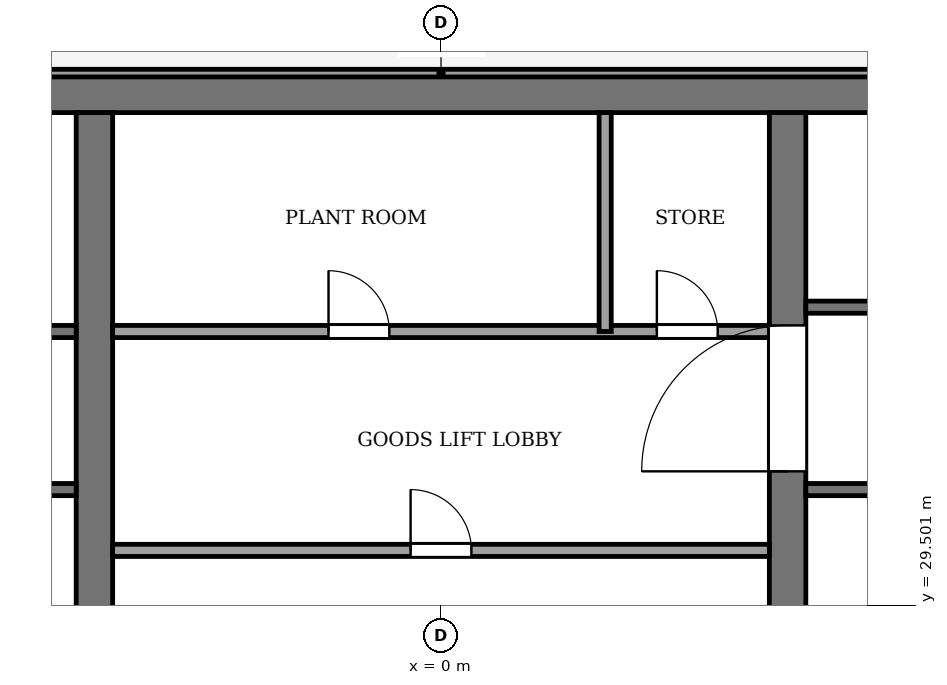
"""IFC4 building model, lengths in metres.
Left out: names, types, materials, properties, quantities, classifications, styles, units other than length and angle.
Written with IfcOpenShell. Run it as: python <this file> out.ifc"""

import sys

from ifc_helpers import new_model, si_unit, direction, frame, frame_2d, origin, place, context, subcontext, project, spatial, rectangle, extrude, element, fill, save


model = new_model("IFC4")
c1 = context("Model", 3, precision=1e-05, world=origin(), true_north=direction((0.0, 1.0)))
c2 = subcontext(c1, "Body", "Model", "MODEL_VIEW")
j1 = project(units=[si_unit("LENGTHUNIT", "METRE"), si_unit("PLANEANGLEUNIT", "RADIAN")], contexts=[c1])
p1 = place(None, origin())
s1 = spatial("IfcSite", under=j1, at=p1, CompositionType="ELEMENT")
p2 = place(p1, origin())
s2 = spatial("IfcBuilding", under=s1, at=p2, CompositionType="ELEMENT")
p3 = place(p2, frame((0.0, 0.0, 364.0)))
s3 = spatial("IfcBuildingStorey", under=s2, at=p3, CompositionType="ELEMENT", Elevation=364.0)
p4 = place(p3, frame((-13.2, 37.9, -0.15), z_axis=(0.0, 0.0, 1.0), x_axis=(1.0, 0.0, 0.0)))
e1 = element("IfcWall", 1, at=p4, inside=s3, PredefinedType="SHEAR", context=c2, shape_type="SweptSolid", body=[
    extrude(rectangle(XDim=26.4, YDim=0.6, at=frame_2d((13.2, 0.0))), origin(), (0.0, 0.0, 1.0), 4.0),
])
p5 = place(p3, frame((-5.7, 18.4, -0.15), z_axis=(0.0, 0.0, 1.0), x_axis=(0.0, 1.0, 0.0)))
e2 = element("IfcWall", 2, at=p5, inside=s3, PredefinedType="SHEAR", context=c2, shape_type="SweptSolid", body=[
    extrude(rectangle(XDim=19.2, YDim=0.6, at=frame_2d((9.6, 0.0))), origin(), (0.0, 0.0, 1.0), 4.0),
])
p6 = place(p5, frame((8.35, 0.0, 0.15)))
e3 = element("IfcOpeningElement", 3, at=p6, cuts=e2, PredefinedType="OPENING", context=c2, shape_type="SweptSolid", body=[
    extrude(rectangle(XDim=0.9, YDim=2.1, at=frame_2d((0.45, 1.05))), frame((0.0, 0.31, 0.0), z_axis=(0.0, -1.0, 0.0), x_axis=(1.0, 0.0, 0.0)), (0.0, 0.0, 1.0), 0.62),
])
p7 = place(p3, frame((5.7, 18.4, -0.15), z_axis=(0.0, 0.0, 1.0), x_axis=(0.0, 1.0, 0.0)))
e4 = element("IfcWall", 4, at=p7, inside=s3, PredefinedType="SHEAR", context=c2, shape_type="SweptSolid", body=[
    extrude(rectangle(XDim=19.2, YDim=0.6, at=frame_2d((9.6, 0.0))), origin(), (0.0, 0.0, 1.0), 4.0),
])
p8 = place(p7, frame((13.3, 0.0, 0.15)))
e5 = element("IfcOpeningElement", 5, at=p8, cuts=e4, PredefinedType="OPENING", context=c2, shape_type="SweptSolid", body=[
    extrude(rectangle(XDim=2.4, YDim=2.4, at=frame_2d((1.2, 1.2))), frame((0.0, 0.31, 0.0), z_axis=(0.0, -1.0, 0.0), x_axis=(1.0, 0.0, 0.0)), (0.0, 0.0, 1.0), 0.62),
])
p9 = place(p3, frame((-5.4, 30.4, 0.0), z_axis=(0.0, 0.0, 1.0), x_axis=(1.0, 0.0, 0.0)))
e6 = element("IfcWall", 6, at=p9, inside=s3, PredefinedType="PARTITIONING", context=c2, shape_type="SweptSolid", body=[
    extrude(rectangle(XDim=10.8, YDim=0.2, at=frame_2d((5.4, 0.0))), origin(), (0.0, 0.0, 1.0), 3.85),
])
p10 = place(p9, frame((4.9, 0.0, 0.0)))
e7 = element("IfcOpeningElement", 7, at=p10, cuts=e6, PredefinedType="OPENING", context=c2, shape_type="SweptSolid", body=[
    extrude(rectangle(XDim=1.0, YDim=2.1, at=frame_2d((0.5, 1.05))), frame((0.0, 0.11, 0.0), z_axis=(0.0, -1.0, 0.0), x_axis=(1.0, 0.0, 0.0)), (0.0, 0.0, 1.0), 0.22),
])
p11 = place(p3, frame((-12.6, 31.4, 0.0), z_axis=(0.0, 0.0, 1.0), x_axis=(1.0, 0.0, 0.0)))
e8 = element("IfcWall", 8, at=p11, inside=s3, PredefinedType="PARTITIONING", context=c2, shape_type="SweptSolid", body=[
    extrude(rectangle(XDim=6.6, YDim=0.2, at=frame_2d((3.3, 0.0))), origin(), (0.0, 0.0, 1.0), 3.85),
])
p12 = place(p11, frame((1.0, 0.0, 0.0)))
e9 = element("IfcOpeningElement", 9, at=p12, cuts=e8, PredefinedType="OPENING", context=c2, shape_type="SweptSolid", body=[
    extrude(rectangle(XDim=1.2, YDim=2.2, at=frame_2d((0.6, 1.1))), frame((0.0, 0.11, 0.0), z_axis=(0.0, -1.0, 0.0), x_axis=(1.0, 0.0, 0.0)), (0.0, 0.0, 1.0), 0.22),
])
p13 = place(p3, frame((6.0, 31.4, 0.0), z_axis=(0.0, 0.0, 1.0), x_axis=(1.0, 0.0, 0.0)))
e10 = element("IfcWall", 10, at=p13, inside=s3, PredefinedType="PARTITIONING", context=c2, shape_type="SweptSolid", body=[
    extrude(rectangle(XDim=6.6, YDim=0.2, at=frame_2d((3.3, 0.0))), origin(), (0.0, 0.0, 1.0), 3.85),
])
p14 = place(p3, frame((-12.6, 34.0, 0.0), z_axis=(0.0, 0.0, 1.0), x_axis=(1.0, 0.0, 0.0)))
e11 = element("IfcWall", 11, at=p14, inside=s3, PredefinedType="PARTITIONING", context=c2, shape_type="SweptSolid", body=[
    extrude(rectangle(XDim=6.6, YDim=0.2, at=frame_2d((3.3, 0.0))), origin(), (0.0, 0.0, 1.0), 3.85),
])
p15 = place(p14, frame((4.7, 0.0, 0.0)))
e12 = element("IfcOpeningElement", 12, at=p15, cuts=e11, PredefinedType="OPENING", context=c2, shape_type="SweptSolid", body=[
    extrude(rectangle(XDim=1.4, YDim=2.2, at=frame_2d((0.7, 1.1))), frame((0.0, 0.11, 0.0), z_axis=(0.0, -1.0, 0.0), x_axis=(1.0, 0.0, 0.0)), (0.0, 0.0, 1.0), 0.22),
])
p16 = place(p14, frame((2.3, 0.0, 0.0)))
e13 = element("IfcOpeningElement", 13, at=p16, cuts=e11, PredefinedType="OPENING", context=c2, shape_type="SweptSolid", body=[
    extrude(rectangle(XDim=1.4, YDim=2.2, at=frame_2d((0.7, 1.1))), frame((0.0, 0.11, 0.0), z_axis=(0.0, -1.0, 0.0), x_axis=(1.0, 0.0, 0.0)), (0.0, 0.0, 1.0), 0.22),
])
p17 = place(p14, frame((0.45, 0.0, 0.0)))
e14 = element("IfcOpeningElement", 14, at=p17, cuts=e11, PredefinedType="OPENING", context=c2, shape_type="SweptSolid", body=[
    extrude(rectangle(XDim=0.9, YDim=2.1, at=frame_2d((0.45, 1.05))), frame((0.0, 0.11, 0.0), z_axis=(0.0, -1.0, 0.0), x_axis=(1.0, 0.0, 0.0)), (0.0, 0.0, 1.0), 0.22),
])
p18 = place(p3, frame((-5.4, 34.0, 0.0), z_axis=(0.0, 0.0, 1.0), x_axis=(1.0, 0.0, 0.0)))
e15 = element("IfcWall", 15, at=p18, inside=s3, PredefinedType="PARTITIONING", context=c2, shape_type="SweptSolid", body=[
    extrude(rectangle(XDim=10.8, YDim=0.2, at=frame_2d((5.4, 0.0))), origin(), (0.0, 0.0, 1.0), 3.85),
])
p19 = place(p18, frame((3.55, 0.0, 0.0)))
e16 = element("IfcOpeningElement", 16, at=p19, cuts=e15, PredefinedType="OPENING", context=c2, shape_type="SweptSolid", body=[
    extrude(rectangle(XDim=1.0, YDim=2.1, at=frame_2d((0.5, 1.05))), frame((0.0, 0.11, 0.0), z_axis=(0.0, -1.0, 0.0), x_axis=(1.0, 0.0, 0.0)), (0.0, 0.0, 1.0), 0.22),
])
p20 = place(p18, frame((8.95, 0.0, 0.0)))
e17 = element("IfcOpeningElement", 17, at=p20, cuts=e15, PredefinedType="OPENING", context=c2, shape_type="SweptSolid", body=[
    extrude(rectangle(XDim=1.0, YDim=2.1, at=frame_2d((0.5, 1.05))), frame((0.0, 0.11, 0.0), z_axis=(0.0, -1.0, 0.0), x_axis=(1.0, 0.0, 0.0)), (0.0, 0.0, 1.0), 0.22),
])
p21 = place(p3, frame((6.0, 34.4, 0.0), z_axis=(0.0, 0.0, 1.0), x_axis=(1.0, 0.0, 0.0)))
e18 = element("IfcWall", 18, at=p21, inside=s3, PredefinedType="PARTITIONING", context=c2, shape_type="SweptSolid", body=[
    extrude(rectangle(XDim=6.6, YDim=0.2, at=frame_2d((3.3, 0.0))), origin(), (0.0, 0.0, 1.0), 3.85),
])
p22 = place(p21, frame((4.8, 0.0, 0.0)))
e19 = element("IfcOpeningElement", 19, at=p22, cuts=e18, PredefinedType="OPENING", context=c2, shape_type="SweptSolid", body=[
    extrude(rectangle(XDim=1.2, YDim=2.2, at=frame_2d((0.6, 1.1))), frame((0.0, 0.11, 0.0), z_axis=(0.0, -1.0, 0.0), x_axis=(1.0, 0.0, 0.0)), (0.0, 0.0, 1.0), 0.22),
])
p23 = place(p3, frame((2.7, 34.0, 0.0), z_axis=(0.0, 0.0, 1.0), x_axis=(0.0, 1.0, 0.0)))
e20 = element("IfcWall", 20, at=p23, inside=s3, PredefinedType="PARTITIONING", context=c2, shape_type="SweptSolid", body=[
    extrude(rectangle(XDim=3.6, YDim=0.2, at=frame_2d((1.8, 0.0))), origin(), (0.0, 0.0, 1.0), 3.85),
])
p24 = place(p3, frame((13.2, 38.25, 0.0), z_axis=(0.0, 0.0, 1.0), x_axis=(-1.0, 0.0, 0.0)))
e21 = element("IfcWall", 21, at=p24, inside=s3, PredefinedType="PARTITIONING", context=c2, shape_type="SweptSolid", body=[
    extrude(rectangle(XDim=26.4, YDim=0.125, at=frame_2d((13.2, 0.0))), origin(), (0.0, 0.0, 1.0), 3.37),
])
p25 = place(p10, origin())
e22 = element("IfcDoor", 22, at=p25, inside=s3, OperationType="SINGLE_SWING_LEFT", PredefinedType="DOOR", context=c2, shape_type="SweptSolid", body=[
    extrude(rectangle(XDim=1.0, YDim=2.1, at=frame_2d((0.5, 1.05))), frame((0.0, 0.025, 0.0), z_axis=(0.0, -1.0, 0.0), x_axis=(1.0, 0.0, 0.0)), (0.0, 0.0, 1.0), 0.05),
])
fill(e7, e22)
p26 = place(p19, origin())
e23 = element("IfcDoor", 23, at=p26, inside=s3, OperationType="SINGLE_SWING_LEFT", PredefinedType="DOOR", context=c2, shape_type="SweptSolid", body=[
    extrude(rectangle(XDim=1.0, YDim=2.1, at=frame_2d((0.5, 1.05))), frame((0.0, 0.025, 0.0), z_axis=(0.0, -1.0, 0.0), x_axis=(1.0, 0.0, 0.0)), (0.0, 0.0, 1.0), 0.05),
])
fill(e16, e23)
p27 = place(p20, origin())
e24 = element("IfcDoor", 24, at=p27, inside=s3, OperationType="SINGLE_SWING_LEFT", PredefinedType="DOOR", context=c2, shape_type="SweptSolid", body=[
    extrude(rectangle(XDim=1.0, YDim=2.1, at=frame_2d((0.5, 1.05))), frame((0.0, 0.025, 0.0), z_axis=(0.0, -1.0, 0.0), x_axis=(1.0, 0.0, 0.0)), (0.0, 0.0, 1.0), 0.05),
])
fill(e17, e24)
p28 = place(p8, origin())
e25 = element("IfcDoor", 25, at=p28, inside=s3, OperationType="DOUBLE_DOOR_SINGLE_SWING", PredefinedType="DOOR", context=c2, shape_type="SweptSolid", body=[
    extrude(rectangle(XDim=2.4, YDim=2.4, at=frame_2d((1.2, 1.2))), frame((0.0, 0.025, 0.0), z_axis=(0.0, -1.0, 0.0), x_axis=(1.0, 0.0, 0.0)), (0.0, 0.0, 1.0), 0.05),
])
fill(e5, e25)
save(model, sys.argv[1])
